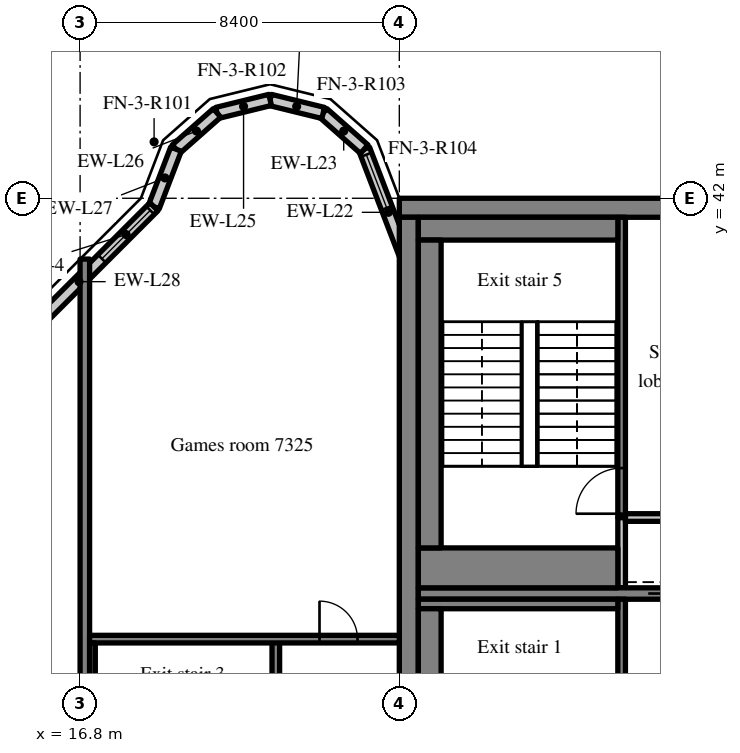
"""IFC4 building model, lengths in metres.
Left out: names, types, materials, properties, quantities, classifications, styles, units other than length and angle.
Written with IfcOpenShell. Run it as: python <this file> out.ifc"""

import sys

from ifc_helpers import new_model, si_unit, direction, frame, frame_2d, origin, place, context, subcontext, project, spatial, rectangle, extrude, source, transform, mapped, element, fill, save


model = new_model("IFC4")
c1 = context("Model", 3, precision=1e-05, world=origin(), true_north=direction((0.0, 1.0)))
c2 = subcontext(c1, "Body", "Model", "MODEL_VIEW")
j1 = project(units=[si_unit("LENGTHUNIT", "METRE"), si_unit("PLANEANGLEUNIT", "RADIAN")], contexts=[c1])
p1 = place(None, origin())
s1 = spatial("IfcSite", under=j1, at=p1, CompositionType="ELEMENT")
p2 = place(p1, origin())
s2 = spatial("IfcBuilding", under=s1, at=p2, CompositionType="ELEMENT")
p3 = place(p2, frame((0.0, 0.0, 305.7)))
s3 = spatial("IfcBuildingStorey", under=s2, at=p3, CompositionType="ELEMENT", Elevation=305.7)
m1 = source(origin(), c2, "Body", "SweptSolid", [
    extrude(rectangle(XDim=50.4, YDim=0.5, at=frame_2d((25.2, 0.0))), origin(), (0.0, 0.0, 1.0), 3.72),
])
p4 = place(p3, frame((25.2, 41.75, 0.0), z_axis=(0.0, 0.0, 1.0), x_axis=(1.0, 0.0, 0.0)))
e1 = element("IfcWall", 1, at=p4, inside=s3, PredefinedType="SHEAR", context=c2, shape_type="MappedRepresentation", body=[
    mapped(m1, transform((0.0, 0.0, 0.0), scale=1.0)),
])
m2 = source(origin(), c2, "Body", "SweptSolid", [
    extrude(rectangle(XDim=19.0, YDim=0.5, at=frame_2d((9.5, 0.0))), origin(), (0.0, 0.0, 1.0), 3.72),
])
p5 = place(p3, frame((25.45, 22.5, 0.0), z_axis=(0.0, 0.0, 1.0), x_axis=(0.0, 1.0, 0.0)))
e2 = element("IfcWall", 2, at=p5, inside=s3, PredefinedType="SHEAR", context=c2, shape_type="MappedRepresentation", body=[
    mapped(m2, transform((0.0, 0.0, 0.0), scale=1.0)),
])
m3 = source(origin(), c2, "Body", "SweptSolid", [
    extrude(rectangle(XDim=7.75, YDim=0.3, at=frame_2d((3.875, 0.0))), origin(), (0.0, 0.0, 1.0), 3.72),
])
p6 = place(p3, frame((25.7, 31.6, 0.0), z_axis=(0.0, 0.0, 1.0), x_axis=(1.0, 0.0, 0.0)))
e3 = element("IfcWall", 3, at=p6, inside=s3, PredefinedType="SHEAR", context=c2, shape_type="MappedRepresentation", body=[
    mapped(m3, transform((0.0, 0.0, 0.0), scale=1.0)),
])
m4 = source(origin(), c2, "Body", "SweptSolid", [
    extrude(rectangle(XDim=1.1, YDim=2.1, at=frame_2d((0.55, 1.05))), frame((0.0, 0.16, 0.0), z_axis=(0.0, -1.0, 0.0), x_axis=(1.0, 0.0, 0.0)), (0.0, 0.0, 1.0), 0.32),
])
p7 = place(p6, frame((6.05, 0.0, 0.0)))
e4 = element("IfcOpeningElement", 4, at=p7, cuts=e3, PredefinedType="OPENING", context=c2, shape_type="MappedRepresentation", body=[
    mapped(m4, transform((0.0, 0.0, 0.0), scale=1.0)),
])
m5 = source(origin(), c2, "Body", "SweptSolid", [
    extrude(rectangle(XDim=18.4, YDim=0.25, at=frame_2d((9.2, 0.0))), origin(), (0.0, 0.0, 1.0), 3.72),
])
p8 = place(p3, frame((16.925, 22.0, 0.0), z_axis=(0.0, 0.0, 1.0), x_axis=(0.0, 1.0, 0.0)))
e5 = element("IfcWall", 5, at=p8, inside=s3, PredefinedType="SHEAR", context=c2, shape_type="MappedRepresentation", body=[
    mapped(m5, transform((0.0, 0.0, 0.0), scale=1.0)),
])
m6 = source(origin(), c2, "Body", "SweptSolid", [
    extrude(rectangle(XDim=3.559, YDim=0.3, at=frame_2d((1.78, 0.0))), origin(), (0.0, 0.0, 1.0), 3.72),
])
p9 = place(p3, frame((25.55, 39.969, 0.0), z_axis=(0.0, 0.0, 1.0), x_axis=(-0.35779745313, 0.933799219604, 0.0)))
e6 = element("IfcWall", 6, at=p9, inside=s3, PredefinedType="SOLIDWALL", context=c2, shape_type="MappedRepresentation", body=[
    mapped(m6, transform((0.0, 0.0, 0.0), scale=1.0)),
])
m7 = source(origin(), c2, "Body", "SweptSolid", [
    extrude(rectangle(XDim=1.5, YDim=2.0, at=frame_2d((0.75, 1.0))), frame((0.0, 0.16, 0.0), z_axis=(0.0, -1.0, 0.0), x_axis=(1.0, 0.0, 0.0)), (0.0, 0.0, 1.0), 0.32),
])
p10 = place(p9, frame((1.903, 0.0, 0.9)))
e7 = element("IfcOpeningElement", 7, at=p10, cuts=e6, PredefinedType="OPENING", context=c2, shape_type="MappedRepresentation", body=[
    mapped(m7, transform((0.0, 0.0, 0.0), scale=1.0)),
])
m8 = source(origin(), c2, "Body", "SweptSolid", [
    extrude(rectangle(XDim=1.44, YDim=0.3, at=frame_2d((0.72, 0.0))), origin(), (0.0, 0.0, 1.0), 3.72),
])
p11 = place(p3, frame((24.277, 43.292, 0.0), z_axis=(0.0, 0.0, 1.0), x_axis=(-0.749649827867, 0.661834673902, 0.0)))
e8 = element("IfcWall", 8, at=p11, inside=s3, PredefinedType="SOLIDWALL", context=c2, shape_type="MappedRepresentation", body=[
    mapped(m8, transform((0.0, 0.0, 0.0), scale=1.0)),
])
m9 = source(origin(), c2, "Body", "SweptSolid", [
    extrude(rectangle(XDim=1.438, YDim=0.3, at=frame_2d((0.719, 0.0))), origin(), (0.0, 0.0, 1.0), 3.72),
])
p12 = place(p3, frame((23.197, 44.245, 0.0), z_axis=(0.0, 0.0, 1.0), x_axis=(-0.971152283879, 0.238460146601, 0.0)))
e9 = element("IfcWall", 9, at=p12, inside=s3, PredefinedType="SOLIDWALL", context=c2, shape_type="MappedRepresentation", body=[
    mapped(m9, transform((0.0, 0.0, 0.0), scale=1.0)),
])
m10 = source(origin(), c2, "Body", "SweptSolid", [
    extrude(rectangle(XDim=1.439, YDim=0.3, at=frame_2d((0.719, 0.0))), origin(), (0.0, 0.0, 1.0), 3.72),
])
p13 = place(p3, frame((21.8, 44.588, 0.0), z_axis=(0.0, 0.0, 1.0), x_axis=(-0.971161932466, -0.238420848351, 0.0)))
e10 = element("IfcWall", 10, at=p13, inside=s3, PredefinedType="SOLIDWALL", context=c2, shape_type="MappedRepresentation", body=[
    mapped(m10, transform((0.0, 0.0, 0.0), scale=1.0)),
])
m11 = source(origin(), c2, "Body", "SweptSolid", [
    extrude(rectangle(XDim=1.44, YDim=0.3, at=frame_2d((0.72, 0.0))), origin(), (0.0, 0.0, 1.0), 3.72),
])
p14 = place(p3, frame((20.403, 44.245, 0.0), z_axis=(0.0, 0.0, 1.0), x_axis=(-0.74957555648, -0.661918790432, 0.0)))
e11 = element("IfcWall", 11, at=p14, inside=s3, PredefinedType="SOLIDWALL", context=c2, shape_type="MappedRepresentation", body=[
    mapped(m11, transform((0.0, 0.0, 0.0), scale=1.0)),
])
m12 = source(origin(), c2, "Body", "SweptSolid", [
    extrude(rectangle(XDim=1.622, YDim=0.3, at=frame_2d((0.811, 0.0))), origin(), (0.0, 0.0, 1.0), 3.72),
])
p15 = place(p3, frame((19.323, 43.292, 0.0), z_axis=(0.0, 0.0, 1.0), x_axis=(-0.357778527068, -0.933806471154, 0.0)))
e12 = element("IfcWall", 12, at=p15, inside=s3, PredefinedType="SOLIDWALL", context=c2, shape_type="MappedRepresentation", body=[
    mapped(m12, transform((0.0, 0.0, 0.0), scale=1.0)),
])
m13 = source(origin(), c2, "Body", "SweptSolid", [
    extrude(rectangle(XDim=5.576, YDim=0.3, at=frame_2d((2.788, 0.0))), origin(), (0.0, 0.0, 1.0), 3.72),
])
p16 = place(p3, frame((18.743, 41.777, 0.0), z_axis=(0.0, 0.0, 1.0), x_axis=(-0.707106781187, -0.707106781187, 0.0)))
e13 = element("IfcWall", 13, at=p16, inside=s3, PredefinedType="SOLIDWALL", context=c2, shape_type="MappedRepresentation", body=[
    mapped(m13, transform((0.0, 0.0, 0.0), scale=1.0)),
])
m14 = source(origin(), c2, "Body", "SweptSolid", [
    extrude(rectangle(XDim=1.8, YDim=1.5, at=frame_2d((0.9, 0.75))), frame((0.0, 0.16, 0.0), z_axis=(0.0, -1.0, 0.0), x_axis=(1.0, 0.0, 0.0)), (0.0, 0.0, 1.0), 0.32),
])
p17 = place(p16, frame((0.135, 0.0, 0.9)))
e14 = element("IfcOpeningElement", 14, at=p17, cuts=e13, PredefinedType="OPENING", context=c2, shape_type="MappedRepresentation", body=[
    mapped(m14, transform((0.0, 0.0, 0.0), scale=1.0)),
])
m15 = source(origin(), c2, "Body", "SweptSolid", [
    extrude(rectangle(XDim=8.95, YDim=0.2, at=frame_2d((4.475, 0.0))), origin(), (0.0, 0.0, 1.0), 3.72),
])
p18 = place(p3, frame((31.05, 22.5, 0.0), z_axis=(0.0, 0.0, 1.0), x_axis=(0.0, 1.0, 0.0)))
e15 = element("IfcWall", 15, at=p18, inside=s3, PredefinedType="SOLIDWALL", context=c2, shape_type="MappedRepresentation", body=[
    mapped(m15, transform((0.0, 0.0, 0.0), scale=1.0)),
])
m16 = source(origin(), c2, "Body", "SweptSolid", [
    extrude(rectangle(XDim=1.2, YDim=2.1, at=frame_2d((0.6, 1.05))), frame((0.0, 0.11, 0.0), z_axis=(0.0, -1.0, 0.0), x_axis=(1.0, 0.0, 0.0)), (0.0, 0.0, 1.0), 0.22),
])
p19 = place(p18, frame((1.1, 0.0, 0.0)))
e16 = element("IfcOpeningElement", 16, at=p19, cuts=e15, PredefinedType="OPENING", context=c2, shape_type="MappedRepresentation", body=[
    mapped(m16, transform((0.0, 0.0, 0.0), scale=1.0)),
])
m17 = source(origin(), c2, "Body", "SweptSolid", [
    extrude(rectangle(XDim=1.85, YDim=0.2, at=frame_2d((0.925, 0.0))), origin(), (0.0, 0.0, 1.0), 3.72),
])
p20 = place(p3, frame((31.05, 31.75, 0.0), z_axis=(0.0, 0.0, 1.0), x_axis=(0.0, 1.0, 0.0)))
e17 = element("IfcWall", 17, at=p20, inside=s3, PredefinedType="SOLIDWALL", context=c2, shape_type="MappedRepresentation", body=[
    mapped(m17, transform((0.0, 0.0, 0.0), scale=1.0)),
])
m18 = source(origin(), c2, "Body", "SweptSolid", [
    extrude(rectangle(XDim=2.3, YDim=0.2, at=frame_2d((1.15, 0.0))), origin(), (0.0, 0.0, 1.0), 3.72),
])
p21 = place(p3, frame((31.15, 33.6, 0.0), z_axis=(0.0, 0.0, 1.0), x_axis=(1.0, 0.0, 0.0)))
e18 = element("IfcWall", 18, at=p21, inside=s3, PredefinedType="SOLIDWALL", context=c2, shape_type="MappedRepresentation", body=[
    mapped(m18, transform((0.0, 0.0, 0.0), scale=1.0)),
])
m19 = source(origin(), c2, "Body", "SweptSolid", [
    extrude(rectangle(XDim=7.9, YDim=0.2, at=frame_2d((3.95, 0.0))), origin(), (0.0, 0.0, 1.0), 3.72),
])
p22 = place(p3, frame((31.05, 33.6, 0.0), z_axis=(0.0, 0.0, 1.0), x_axis=(0.0, 1.0, 0.0)))
e19 = element("IfcWall", 19, at=p22, inside=s3, PredefinedType="SOLIDWALL", context=c2, shape_type="MappedRepresentation", body=[
    mapped(m19, transform((0.0, 0.0, 0.0), scale=1.0)),
])
p23 = place(p22, frame((0.1, 0.0, 0.0)))
e20 = element("IfcOpeningElement", 20, at=p23, cuts=e19, PredefinedType="OPENING", context=c2, shape_type="MappedRepresentation", body=[
    mapped(m16, transform((0.0, 0.0, 0.0), scale=1.0)),
])
m20 = source(origin(), c2, "Body", "SweptSolid", [
    extrude(rectangle(XDim=8.3, YDim=0.2, at=frame_2d((4.15, 0.0))), origin(), (0.0, 0.0, 1.0), 3.72),
])
p24 = place(p3, frame((21.95, 22.1, 0.0), z_axis=(0.0, 0.0, 1.0), x_axis=(0.0, 1.0, 0.0)))
e21 = element("IfcWall", 21, at=p24, inside=s3, PredefinedType="SOLIDWALL", context=c2, shape_type="MappedRepresentation", body=[
    mapped(m20, transform((0.0, 0.0, 0.0), scale=1.0)),
])
p25 = place(p24, frame((0.6, 0.0, 0.0)))
e22 = element("IfcOpeningElement", 22, at=p25, cuts=e21, PredefinedType="OPENING", context=c2, shape_type="MappedRepresentation", body=[
    mapped(m16, transform((0.0, 0.0, 0.0), scale=1.0)),
])
m21 = source(origin(), c2, "Body", "SweptSolid", [
    extrude(rectangle(XDim=8.15, YDim=0.2, at=frame_2d((4.075, 0.0))), origin(), (0.0, 0.0, 1.0), 3.72),
])
p26 = place(p3, frame((17.05, 30.4, 0.0), z_axis=(0.0, 0.0, 1.0), x_axis=(1.0, 0.0, 0.0)))
e23 = element("IfcWall", 23, at=p26, inside=s3, PredefinedType="SOLIDWALL", context=c2, shape_type="MappedRepresentation", body=[
    mapped(m21, transform((0.0, 0.0, 0.0), scale=1.0)),
])
m22 = source(origin(), c2, "Body", "SweptSolid", [
    extrude(rectangle(XDim=1.0, YDim=2.1, at=frame_2d((0.5, 1.05))), frame((0.0, 0.11, 0.0), z_axis=(0.0, -1.0, 0.0), x_axis=(1.0, 0.0, 0.0)), (0.0, 0.0, 1.0), 0.22),
])
p27 = place(p26, frame((6.05, 0.0, 0.0)))
e24 = element("IfcOpeningElement", 24, at=p27, cuts=e23, PredefinedType="OPENING", context=c2, shape_type="MappedRepresentation", body=[
    mapped(m22, transform((0.0, 0.0, 0.0), scale=1.0)),
])
m23 = source(origin(), c2, "Body", "SweptSolid", [
    extrude(rectangle(XDim=5.25, YDim=0.25, at=frame_2d((2.625, 0.0))), origin(), (0.0, 0.0, 1.0), 3.72),
])
p28 = place(p3, frame((25.7, 31.325, 0.0), z_axis=(0.0, 0.0, 1.0), x_axis=(1.0, 0.0, 0.0)))
e25 = element("IfcWall", 25, at=p28, inside=s3, PredefinedType="SOLIDWALL", context=c2, shape_type="MappedRepresentation", body=[
    mapped(m23, transform((0.0, 0.0, 0.0), scale=1.0)),
])
m24 = source(origin(), c2, "Body", "SweptSolid", [
    extrude(rectangle(XDim=8.1, YDim=0.6, at=frame_2d((4.05, 0.0))), origin(), (0.0, 0.0, 1.0), 3.72),
])
p29 = place(p3, frame((26.0, 23.1, 0.0), z_axis=(0.0, 0.0, 1.0), x_axis=(0.0, 1.0, 0.0)))
e26 = element("IfcWall", 26, at=p29, inside=s3, PredefinedType="SOLIDWALL", context=c2, shape_type="MappedRepresentation", body=[
    mapped(m24, transform((0.0, 0.0, 0.0), scale=1.0)),
])
m25 = source(origin(), c2, "Body", "SweptSolid", [
    extrude(rectangle(XDim=8.1, YDim=0.15, at=frame_2d((4.05, 0.0))), origin(), (0.0, 0.0, 1.0), 3.72),
])
p30 = place(p3, frame((17.125, 22.2, 0.0), z_axis=(0.0, 0.0, 1.0), x_axis=(0.0, 1.0, 0.0)))
e27 = element("IfcWall", 27, at=p30, inside=s3, PredefinedType="SOLIDWALL", context=c2, shape_type="MappedRepresentation", body=[
    mapped(m25, transform((0.0, 0.0, 0.0), scale=1.0)),
])
m26 = source(origin(), c2, "Body", "SweptSolid", [
    extrude(rectangle(XDim=5.25, YDim=0.6, at=frame_2d((2.625, 0.0))), origin(), (0.0, 0.0, 1.0), 3.72),
])
p31 = place(p3, frame((25.7, 41.2, 0.0), z_axis=(0.0, 0.0, 1.0), x_axis=(1.0, 0.0, 0.0)))
e28 = element("IfcWall", 28, at=p31, inside=s3, PredefinedType="SOLIDWALL", context=c2, shape_type="MappedRepresentation", body=[
    mapped(m26, transform((0.0, 0.0, 0.0), scale=1.0)),
])
m27 = source(origin(), c2, "Body", "SweptSolid", [
    extrude(rectangle(XDim=5.25, YDim=1.05, at=frame_2d((2.625, 0.0))), origin(), (0.0, 0.0, 1.0), 3.72),
])
p32 = place(p3, frame((25.7, 32.275, 0.0), z_axis=(0.0, 0.0, 1.0), x_axis=(1.0, 0.0, 0.0)))
e29 = element("IfcWall", 29, at=p32, inside=s3, PredefinedType="SOLIDWALL", context=c2, shape_type="MappedRepresentation", body=[
    mapped(m27, transform((0.0, 0.0, 0.0), scale=1.0)),
])
p33 = place(p3, frame((26.0, 32.8, 0.0), z_axis=(0.0, 0.0, 1.0), x_axis=(0.0, 1.0, 0.0)))
e30 = element("IfcWall", 30, at=p33, inside=s3, PredefinedType="SOLIDWALL", context=c2, shape_type="MappedRepresentation", body=[
    mapped(m24, transform((0.0, 0.0, 0.0), scale=1.0)),
])
m28 = source(origin(), c2, "Body", "SweptSolid", [
    extrude(rectangle(XDim=1.5, YDim=2.0, at=frame_2d((0.75, 1.0))), frame((0.0, 0.03, 0.0), z_axis=(0.0, -1.0, 0.0), x_axis=(1.0, 0.0, 0.0)), (0.0, 0.0, 1.0), 0.06),
])
p34 = place(p10, origin())
e31 = element("IfcWindow", 31, at=p34, inside=s3, PartitioningType="SINGLE_PANEL", PredefinedType="WINDOW", context=c2, shape_type="MappedRepresentation", body=[
    mapped(m28, transform((0.0, 0.0, 0.0), scale=1.0)),
])
fill(e7, e31)
m29 = source(origin(), c2, "Body", "SweptSolid", [
    extrude(rectangle(XDim=1.8, YDim=1.5, at=frame_2d((0.9, 0.75))), frame((0.0, 0.03, 0.0), z_axis=(0.0, -1.0, 0.0), x_axis=(1.0, 0.0, 0.0)), (0.0, 0.0, 1.0), 0.06),
])
p35 = place(p17, origin())
e32 = element("IfcWindow", 32, at=p35, inside=s3, PartitioningType="SINGLE_PANEL", PredefinedType="WINDOW", context=c2, shape_type="MappedRepresentation", body=[
    mapped(m29, transform((0.0, 0.0, 0.0), scale=1.0)),
])
fill(e14, e32)
m30 = source(origin(), c2, "Body", "SweptSolid", [
    extrude(rectangle(XDim=1.1, YDim=2.1, at=frame_2d((0.55, 1.05))), frame((0.0, 0.025, 0.0), z_axis=(0.0, -1.0, 0.0), x_axis=(1.0, 0.0, 0.0)), (0.0, 0.0, 1.0), 0.05),
])
p36 = place(p7, origin())
e33 = element("IfcDoor", 33, at=p36, inside=s3, OperationType="SLIDING_TO_LEFT", PredefinedType="DOOR", context=c2, shape_type="MappedRepresentation", body=[
    mapped(m30, transform((0.0, 0.0, 0.0), scale=1.0)),
])
fill(e4, e33)
m31 = source(origin(), c2, "Body", "SweptSolid", [
    extrude(rectangle(XDim=1.2, YDim=2.1, at=frame_2d((0.6, 1.05))), frame((0.0, 0.025, 0.0), z_axis=(0.0, -1.0, 0.0), x_axis=(1.0, 0.0, 0.0)), (0.0, 0.0, 1.0), 0.05),
])
p37 = place(p23, origin())
e34 = element("IfcDoor", 34, at=p37, inside=s3, OperationType="SINGLE_SWING_LEFT", PredefinedType="DOOR", context=c2, shape_type="MappedRepresentation", body=[
    mapped(m31, transform((0.0, 0.0, 0.0), scale=1.0)),
])
fill(e20, e34)
m32 = source(origin(), c2, "Body", "SweptSolid", [
    extrude(rectangle(XDim=1.0, YDim=2.1, at=frame_2d((0.5, 1.05))), frame((0.0, 0.025, 0.0), z_axis=(0.0, -1.0, 0.0), x_axis=(1.0, 0.0, 0.0)), (0.0, 0.0, 1.0), 0.05),
])
p38 = place(p27, origin())
e35 = element("IfcDoor", 35, at=p38, inside=s3, OperationType="SINGLE_SWING_LEFT", PredefinedType="DOOR", context=c2, shape_type="MappedRepresentation", body=[
    mapped(m32, transform((0.0, 0.0, 0.0), scale=1.0)),
])
fill(e24, e35)
save(model, sys.argv[1])
